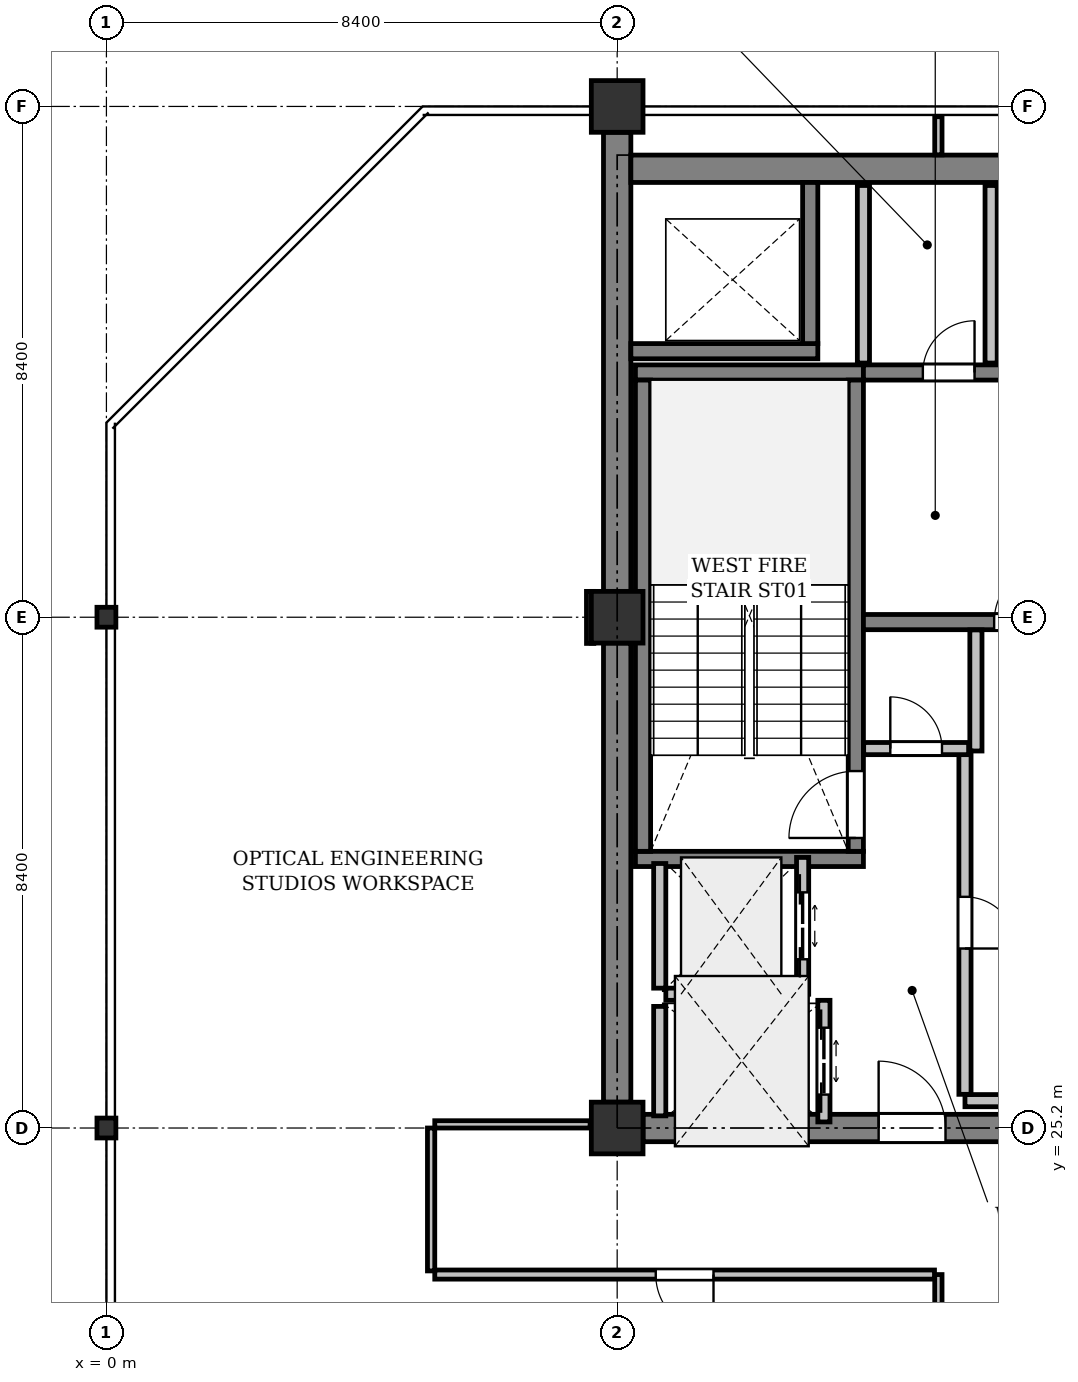
"""IFC4 building model, lengths in metres.
Left out: names, types, materials, properties, quantities, classifications, styles, units other than length and angle.
Written with IfcOpenShell. Run it as: python <this file> out.ifc"""

import sys

from ifc_helpers import new_model, si_unit, direction, frame, frame_2d, origin, origin_2d, place, context, subcontext, project, spatial, rectangle, i_section, extrude, element, fill, save


model = new_model("IFC4")
c1 = context("Model", 3, precision=1e-05, world=origin(), true_north=direction((0.0, 1.0)))
c2 = subcontext(c1, "Body", "Model", "MODEL_VIEW")
j1 = project(units=[si_unit("LENGTHUNIT", "METRE"), si_unit("PLANEANGLEUNIT", "RADIAN")], contexts=[c1])
p1 = place(None, origin())
s1 = spatial("IfcSite", under=j1, at=p1, CompositionType="ELEMENT")
p2 = place(p1, origin())
s2 = spatial("IfcBuilding", under=s1, at=p2, CompositionType="ELEMENT")
p3 = place(p2, frame((0.0, 0.0, 314.2)))
s3 = spatial("IfcBuildingStorey", under=s2, at=p3, CompositionType="ELEMENT", Elevation=314.2)
for number, where, z_axis, x_axis in (
    (1, (0.0, 25.2, 0.0), (0.0, 0.0, 1.0), (1.0, 0.0, 0.0)),
    (2, (0.0, 33.6, 0.0), (0.0, 0.0, 1.0), (1.0, 0.0, 0.0)),
):
    element("IfcColumn", number, at=place(p3, frame(where, z_axis=z_axis, x_axis=x_axis)), inside=s3, PredefinedType="COLUMN", context=c2, shape_type="SweptSolid", body=[
        extrude(i_section(OverallWidth=0.311, OverallDepth=0.327, WebThickness=0.016, FlangeThickness=0.025, FilletRadius=0.017, at=origin_2d()), origin(), (0.0, 0.0, 1.0), 4.0),
    ])
for number, where, z_axis, x_axis in (
    (3, (8.4, 25.2, 0.0), (0.0, 0.0, 1.0), (1.0, 0.0, 0.0)),
    (4, (8.4, 33.6, 0.0), (0.0, 0.0, 1.0), (1.0, 0.0, 0.0)),
    (5, (8.4, 42.0, 0.0), (0.0, 0.0, 1.0), (1.0, 0.0, 0.0)),
):
    element("IfcColumn", number, at=place(p3, frame(where, z_axis=z_axis, x_axis=x_axis)), inside=s3, PredefinedType="COLUMN", context=c2, shape_type="SweptSolid", body=[
        extrude(rectangle(XDim=0.85, YDim=0.85, at=origin_2d()), origin(), (0.0, 0.0, 1.0), 4.0),
    ])
for number, where, z_axis, x_axis in (
    (6, (8.4, 25.625, 0.0), (0.0, 0.0, 1.0), (0.0, 1.0, 0.0)),
    (7, (8.4, 34.025, 0.0), (0.0, 0.0, 1.0), (0.0, 1.0, 0.0)),
):
    element("IfcWall", number, at=place(p3, frame(where, z_axis=z_axis, x_axis=x_axis)), inside=s3, PredefinedType="SHEAR", context=c2, shape_type="SweptSolid", body=[
        extrude(rectangle(XDim=7.55, YDim=0.45, at=frame_2d((3.775, 0.0))), origin(), (0.0, 0.0, 1.0), 3.725),
    ])
p4 = place(p3, frame((8.625, 40.975, 0.0), z_axis=(0.0, 0.0, 1.0), x_axis=(1.0, 0.0, 0.0)))
e8 = element("IfcWall", 8, at=p4, inside=s3, PredefinedType="SHEAR", context=c2, shape_type="SweptSolid", body=[
    extrude(rectangle(XDim=7.95, YDim=0.45, at=frame_2d((3.975, 0.0))), origin(), (0.0, 0.0, 1.0), 3.725),
])
p5 = place(p3, frame((8.825, 25.2, 0.0), z_axis=(0.0, 0.0, 1.0), x_axis=(1.0, 0.0, 0.0)))
e9 = element("IfcWall", 9, at=p5, inside=s3, PredefinedType="SHEAR", context=c2, shape_type="SweptSolid", body=[
    extrude(rectangle(XDim=7.55, YDim=0.45, at=frame_2d((3.775, 0.0))), origin(), (0.0, 0.0, 1.0), 3.725),
])
p6 = place(p5, frame((3.875, 0.0, 0.0)))
e10 = element("IfcOpeningElement", 10, at=p6, cuts=e9, PredefinedType="OPENING", context=c2, shape_type="SweptSolid", body=[
    extrude(rectangle(XDim=1.1, YDim=2.15, at=frame_2d((0.55, 1.075))), frame((0.0, 0.235, 0.0), z_axis=(0.0, -1.0, 0.0), x_axis=(1.0, 0.0, 0.0)), (0.0, 0.0, 1.0), 0.47),
])
for number, where, z_axis, x_axis in (
    (11, (12.45, 29.625, 0.0), (0.0, 0.0, 1.0), (-1.0, 0.0, 0.0)),
    (12, (12.45, 37.625, 0.0), (0.0, 0.0, 1.0), (-1.0, 0.0, 0.0)),
):
    element("IfcWall", number, at=place(p3, frame(where, z_axis=z_axis, x_axis=x_axis)), inside=s3, PredefinedType="SHEAR", context=c2, shape_type="SweptSolid", body=[
        extrude(rectangle(XDim=3.75, YDim=0.25, at=frame_2d((1.875, 0.0))), origin(), (0.0, 0.0, 1.0), 3.725),
    ])
p7 = place(p3, frame((12.325, 29.75, 0.0), z_axis=(0.0, 0.0, 1.0), x_axis=(0.0, 1.0, 0.0)))
e13 = element("IfcWall", 13, at=p7, inside=s3, PredefinedType="SHEAR", context=c2, shape_type="SweptSolid", body=[
    extrude(rectangle(XDim=7.75, YDim=0.25, at=frame_2d((3.875, 0.0))), origin(), (0.0, 0.0, 1.0), 3.725),
])
p8 = place(p7, frame((0.22, 0.0, 0.0)))
e14 = element("IfcOpeningElement", 14, at=p8, cuts=e13, PredefinedType="OPENING", context=c2, shape_type="SweptSolid", body=[
    extrude(rectangle(XDim=1.1, YDim=2.15, at=frame_2d((0.55, 1.075))), frame((0.0, 0.135, 0.0), z_axis=(0.0, -1.0, 0.0), x_axis=(1.0, 0.0, 0.0)), (0.0, 0.0, 1.0), 0.27),
])
p9 = place(p3, frame((8.825, 29.75, 0.0), z_axis=(0.0, 0.0, 1.0), x_axis=(0.0, 1.0, 0.0)))
e15 = element("IfcWall", 15, at=p9, inside=s3, PredefinedType="SHEAR", context=c2, shape_type="SweptSolid", body=[
    extrude(rectangle(XDim=7.75, YDim=0.25, at=frame_2d((3.875, 0.0))), origin(), (0.0, 0.0, 1.0), 3.725),
])
p10 = place(p3, frame((8.625, 37.975, 0.0), z_axis=(0.0, 0.0, 1.0), x_axis=(1.0, 0.0, 0.0)))
e16 = element("IfcWall", 16, at=p10, inside=s3, PredefinedType="SHEAR", context=c2, shape_type="SweptSolid", body=[
    extrude(rectangle(XDim=3.075, YDim=0.25, at=frame_2d((1.538, 0.0))), origin(), (0.0, 0.0, 1.0), 3.725),
])
p11 = place(p3, frame((11.575, 38.1, 0.0), z_axis=(0.0, 0.0, 1.0), x_axis=(0.0, 1.0, 0.0)))
e17 = element("IfcWall", 17, at=p11, inside=s3, PredefinedType="SHEAR", context=c2, shape_type="SweptSolid", body=[
    extrude(rectangle(XDim=2.65, YDim=0.25, at=frame_2d((1.325, 0.0))), origin(), (0.0, 0.0, 1.0), 3.725),
])
p12 = place(p3, frame((12.45, 33.52, 0.0), z_axis=(0.0, 0.0, 1.0), x_axis=(1.0, 0.0, 0.0)))
e18 = element("IfcWall", 18, at=p12, inside=s3, PredefinedType="SHEAR", context=c2, shape_type="SweptSolid", body=[
    extrude(rectangle(XDim=3.925, YDim=0.25, at=frame_2d((1.962, 0.0))), origin(), (0.0, 0.0, 1.0), 3.725),
])
p13 = place(p12, frame((2.15, 0.0, 0.0)))
e19 = element("IfcOpeningElement", 19, at=p13, cuts=e18, PredefinedType="OPENING", context=c2, shape_type="SweptSolid", body=[
    extrude(rectangle(XDim=1.0, YDim=2.15, at=frame_2d((0.5, 1.075))), frame((0.0, 0.135, 0.0), z_axis=(0.0, -1.0, 0.0), x_axis=(1.0, 0.0, 0.0)), (0.0, 0.0, 1.0), 0.27),
])
p14 = place(p3, frame((12.45, 37.625, 0.0), z_axis=(0.0, 0.0, 1.0), x_axis=(1.0, 0.0, 0.0)))
e20 = element("IfcWall", 20, at=p14, inside=s3, PredefinedType="SHEAR", context=c2, shape_type="SweptSolid", body=[
    extrude(rectangle(XDim=4.125, YDim=0.25, at=frame_2d((2.062, 0.0))), origin(), (0.0, 0.0, 1.0), 3.725),
])
p15 = place(p14, frame((0.978, 0.0, 0.0)))
e21 = element("IfcOpeningElement", 21, at=p15, cuts=e20, PredefinedType="OPENING", context=c2, shape_type="SweptSolid", body=[
    extrude(rectangle(XDim=0.85, YDim=2.15, at=frame_2d((0.425, 1.075))), frame((0.0, 0.135, 0.0), z_axis=(0.0, -1.0, 0.0), x_axis=(1.0, 0.0, 0.0)), (0.0, 0.0, 1.0), 0.27),
])
p16 = place(p14, frame((2.298, 0.0, 0.0)))
e22 = element("IfcOpeningElement", 22, at=p16, cuts=e20, PredefinedType="OPENING", context=c2, shape_type="SweptSolid", body=[
    extrude(rectangle(XDim=0.85, YDim=2.15, at=frame_2d((0.425, 1.075))), frame((0.0, 0.135, 0.0), z_axis=(0.0, -1.0, 0.0), x_axis=(1.0, 0.0, 0.0)), (0.0, 0.0, 1.0), 0.27),
])
p17 = place(p3, frame((11.45, 27.4, 0.0), z_axis=(0.0, 0.0, 1.0), x_axis=(0.0, 1.0, 0.0)))
e23 = element("IfcWall", 23, at=p17, inside=s3, PredefinedType="PARTITIONING", context=c2, shape_type="SweptSolid", body=[
    extrude(rectangle(XDim=2.25, YDim=0.2, at=frame_2d((1.125, 0.0))), origin(), (0.0, 0.0, 1.0), 3.725),
])
p18 = place(p17, frame((0.575, 0.0, 0.0)))
e24 = element("IfcOpeningElement", 24, at=p18, cuts=e23, PredefinedType="OPENING", context=c2, shape_type="SweptSolid", body=[
    extrude(rectangle(XDim=1.1, YDim=2.2, at=frame_2d((0.55, 1.1))), frame((0.0, 0.11, 0.0), z_axis=(0.0, -1.0, 0.0), x_axis=(1.0, 0.0, 0.0)), (0.0, 0.0, 1.0), 0.22),
])
p19 = place(p3, frame((9.1, 27.5, 0.0), z_axis=(0.0, 0.0, 1.0), x_axis=(0.0, 1.0, 0.0)))
e25 = element("IfcWall", 25, at=p19, inside=s3, PredefinedType="PARTITIONING", context=c2, shape_type="SweptSolid", body=[
    extrude(rectangle(XDim=2.05, YDim=0.2, at=frame_2d((1.025, 0.0))), origin(), (0.0, 0.0, 1.0), 3.725),
])
p20 = place(p3, frame((9.2, 27.4, 0.0), z_axis=(0.0, 0.0, 1.0), x_axis=(1.0, 0.0, 0.0)))
e26 = element("IfcWall", 26, at=p20, inside=s3, PredefinedType="PARTITIONING", context=c2, shape_type="SweptSolid", body=[
    extrude(rectangle(XDim=2.15, YDim=0.2, at=frame_2d((1.075, 0.0))), origin(), (0.0, 0.0, 1.0), 3.725),
])
p21 = place(p3, frame((11.8, 25.3, 0.0), z_axis=(0.0, 0.0, 1.0), x_axis=(0.0, 1.0, 0.0)))
e27 = element("IfcWall", 27, at=p21, inside=s3, PredefinedType="PARTITIONING", context=c2, shape_type="SweptSolid", body=[
    extrude(rectangle(XDim=2.0, YDim=0.2, at=frame_2d((1.0, 0.0))), origin(), (0.0, 0.0, 1.0), 3.725),
])
p22 = place(p21, frame((0.45, 0.0, 0.0)))
e28 = element("IfcOpeningElement", 28, at=p22, cuts=e27, PredefinedType="OPENING", context=c2, shape_type="SweptSolid", body=[
    extrude(rectangle(XDim=1.1, YDim=2.2, at=frame_2d((0.55, 1.1))), frame((0.0, 0.11, 0.0), z_axis=(0.0, -1.0, 0.0), x_axis=(1.0, 0.0, 0.0)), (0.0, 0.0, 1.0), 0.22),
])
p23 = place(p3, frame((9.1, 25.4, 0.0), z_axis=(0.0, 0.0, 1.0), x_axis=(0.0, 1.0, 0.0)))
e29 = element("IfcWall", 29, at=p23, inside=s3, PredefinedType="PARTITIONING", context=c2, shape_type="SweptSolid", body=[
    extrude(rectangle(XDim=1.8, YDim=0.2, at=frame_2d((0.9, 0.0))), origin(), (0.0, 0.0, 1.0), 3.725),
])
p24 = place(p3, frame((14.12, 25.65, 0.0), z_axis=(0.0, 0.0, 1.0), x_axis=(1.0, 0.0, 0.0)))
e30 = element("IfcWall", 30, at=p24, inside=s3, PredefinedType="PARTITIONING", context=c2, shape_type="SweptSolid", body=[
    extrude(rectangle(XDim=2.33, YDim=0.2, at=frame_2d((1.165, 0.0))), origin(), (0.0, 0.0, 1.0), 3.725),
])
p25 = place(p3, frame((14.3, 33.391, 0.0), z_axis=(0.0, 0.0, 1.0), x_axis=(0.0, -1.0, 0.0)))
e31 = element("IfcWall", 31, at=p25, inside=s3, PredefinedType="PARTITIONING", context=c2, shape_type="SweptSolid", body=[
    extrude(rectangle(XDim=1.991, YDim=0.2, at=frame_2d((0.996, 0.0))), origin(), (0.0, 0.0, 1.0), 3.725),
])
p26 = place(p3, frame((14.12, 31.4, 0.0), z_axis=(0.0, 0.0, 1.0), x_axis=(0.0, -1.0, 0.0)))
e32 = element("IfcWall", 32, at=p26, inside=s3, PredefinedType="PARTITIONING", context=c2, shape_type="SweptSolid", body=[
    extrude(rectangle(XDim=5.646, YDim=0.2, at=frame_2d((2.823, 0.0))), origin(), (0.0, 0.0, 1.0), 3.725),
])
p27 = place(p26, frame((2.398, 0.0, 0.0)))
e33 = element("IfcOpeningElement", 33, at=p27, cuts=e32, PredefinedType="OPENING", context=c2, shape_type="SweptSolid", body=[
    extrude(rectangle(XDim=0.85, YDim=2.15, at=frame_2d((0.425, 1.075))), frame((0.0, 0.11, 0.0), z_axis=(0.0, -1.0, 0.0), x_axis=(1.0, 0.0, 0.0)), (0.0, 0.0, 1.0), 0.22),
])
p28 = place(p3, frame((12.454, 31.44, 0.0), z_axis=(0.0, 0.0, 1.0), x_axis=(1.0, 0.0, 0.0)))
e34 = element("IfcWall", 34, at=p28, inside=s3, PredefinedType="PARTITIONING", context=c2, shape_type="SweptSolid", body=[
    extrude(rectangle(XDim=1.726, YDim=0.2, at=frame_2d((0.863, 0.0))), origin(), (0.0, 0.0, 1.0), 3.725),
])
p29 = place(p28, frame((0.438, 0.0, 0.0)))
e35 = element("IfcOpeningElement", 35, at=p29, cuts=e34, PredefinedType="OPENING", context=c2, shape_type="SweptSolid", body=[
    extrude(rectangle(XDim=0.85, YDim=2.15, at=frame_2d((0.425, 1.075))), frame((0.0, 0.11, 0.0), z_axis=(0.0, -1.0, 0.0), x_axis=(1.0, 0.0, 0.0)), (0.0, 0.0, 1.0), 0.22),
])
for number, where, z_axis, x_axis in (
    (36, (14.55, 37.78, 0.0), (0.0, 0.0, 1.0), (0.0, 1.0, 0.0)),
    (37, (12.45, 40.7, 0.0), (0.0, 0.0, 1.0), (0.0, -1.0, 0.0)),
):
    element("IfcWall", number, at=place(p3, frame(where, z_axis=z_axis, x_axis=x_axis)), inside=s3, PredefinedType="PARTITIONING", context=c2, shape_type="SweptSolid", body=[
        extrude(rectangle(XDim=2.92, YDim=0.2, at=frame_2d((1.46, 0.0))), origin(), (0.0, 0.0, 1.0), 2.775),
    ])
p30 = place(p3, frame((5.34, 23.214, 0.0), z_axis=(0.0, 0.0, 1.0), x_axis=(-1.0, 0.0, 0.0)))
e38 = element("IfcWall", 38, at=p30, inside=s3, PredefinedType="PARTITIONING", context=c2, shape_type="SweptSolid", body=[
    extrude(rectangle(XDim=5.171, YDim=0.135, at=frame_2d((2.585, 0.0))), origin(), (0.0, 0.0, 1.0), 3.421),
])
p31 = place(p3, frame((14.09, 20.266, 0.0), z_axis=(0.0, 0.0, 1.0), x_axis=(0.0, 1.0, 0.0)))
e39 = element("IfcWall", 39, at=p31, inside=s3, PredefinedType="PARTITIONING", context=c2, shape_type="SweptSolid", body=[
    extrude(rectangle(XDim=2.524, YDim=0.12, at=frame_2d((1.262, 0.0))), origin(), (0.0, 0.0, 1.0), 3.725),
])
p32 = place(p3, frame((14.026, 22.79, 0.0), z_axis=(0.0, 0.0, 1.0), x_axis=(-1.0, 0.0, 0.0)))
e40 = element("IfcWall", 40, at=p32, inside=s3, PredefinedType="PARTITIONING", context=c2, shape_type="SweptSolid", body=[
    extrude(rectangle(XDim=8.626, YDim=0.15, at=frame_2d((4.313, 0.0))), origin(), (0.0, 0.0, 1.0), 3.319),
])
p33 = place(p32, frame((3.838, 0.0, 0.0)))
e41 = element("IfcOpeningElement", 41, at=p33, cuts=e40, PredefinedType="OPENING", context=c2, shape_type="SweptSolid", body=[
    extrude(rectangle(XDim=0.95, YDim=2.15, at=frame_2d((0.475, 1.075))), frame((0.0, 0.085, 0.0), z_axis=(0.0, -1.0, 0.0), x_axis=(1.0, 0.0, 0.0)), (0.0, 0.0, 1.0), 0.17),
])
p34 = place(p3, frame((13.683, 41.831, 0.0), z_axis=(0.0, 0.0, 1.0), x_axis=(0.0, -1.0, 0.0)))
e42 = element("IfcWall", 42, at=p34, inside=s3, PredefinedType="PARTITIONING", context=c2, shape_type="SweptSolid", body=[
    extrude(rectangle(XDim=0.627, YDim=0.12, at=frame_2d((0.313, 0.0))), origin(), (0.0, 0.0, 1.0), 3.725),
])
p35 = place(p3, frame((5.34, 23.334, 0.0), z_axis=(0.0, 0.0, 1.0), x_axis=(0.0, 1.0, 0.0)))
e43 = element("IfcWall", 43, at=p35, inside=s3, PredefinedType="PARTITIONING", context=c2, shape_type="SweptSolid", body=[
    extrude(rectangle(XDim=1.865, YDim=0.12, at=frame_2d((0.933, 0.0))), origin(), (0.0, 0.0, 1.0), 3.271),
])
p36 = place(p3, frame((5.4, 25.26, 0.0), z_axis=(0.0, 0.0, 1.0), x_axis=(1.0, 0.0, 0.0)))
e44 = element("IfcWall", 44, at=p36, inside=s3, PredefinedType="PARTITIONING", context=c2, shape_type="SweptSolid", body=[
    extrude(rectangle(XDim=2.555, YDim=0.12, at=frame_2d((1.278, 0.0))), origin(), (0.0, 0.0, 1.0), 3.271),
])
p37 = place(p36, frame((0.802, 0.0, 0.0)))
e45 = element("IfcOpeningElement", 45, at=p37, cuts=e44, PredefinedType="OPENING", context=c2, shape_type="SweptSolid", body=[
    extrude(rectangle(XDim=0.95, YDim=2.15, at=frame_2d((0.475, 1.075))), frame((0.0, 0.07, 0.0), z_axis=(0.0, -1.0, 0.0), x_axis=(1.0, 0.0, 0.0)), (0.0, 0.0, 1.0), 0.14),
])
p38 = place(p3, frame((7.956, 33.169, 0.0), z_axis=(0.0, 0.0, 1.0), x_axis=(-0.000855919801, 0.999999633701, 0.0)))
e46 = element("IfcWall", 46, at=p38, inside=s3, PredefinedType="PARTITIONING", context=c2, shape_type="SweptSolid", body=[
    extrude(rectangle(XDim=0.856, YDim=0.12, at=frame_2d((0.428, 0.0))), origin(), (0.0, 0.0, 1.0), 3.271),
])
p39 = place(p6, origin())
e47 = element("IfcDoor", 47, at=p39, inside=s3, OperationType="SINGLE_SWING_RIGHT", PredefinedType="DOOR", context=c2, shape_type="SweptSolid", body=[
    extrude(rectangle(XDim=1.1, YDim=2.15, at=frame_2d((0.55, 1.075))), frame((0.0, 0.025, 0.0), z_axis=(0.0, -1.0, 0.0), x_axis=(1.0, 0.0, 0.0)), (0.0, 0.0, 1.0), 0.05),
])
fill(e10, e47)
p40 = place(p8, origin())
e48 = element("IfcDoor", 48, at=p40, inside=s3, OperationType="SINGLE_SWING_RIGHT", PredefinedType="DOOR", context=c2, shape_type="SweptSolid", body=[
    extrude(rectangle(XDim=1.1, YDim=2.15, at=frame_2d((0.55, 1.075))), frame((0.0, 0.025, 0.0), z_axis=(0.0, -1.0, 0.0), x_axis=(1.0, 0.0, 0.0)), (0.0, 0.0, 1.0), 0.05),
])
fill(e14, e48)
p41 = place(p13, origin())
e49 = element("IfcDoor", 49, at=p41, inside=s3, OperationType="SINGLE_SWING_RIGHT", PredefinedType="DOOR", context=c2, shape_type="SweptSolid", body=[
    extrude(rectangle(XDim=1.0, YDim=2.15, at=frame_2d((0.5, 1.075))), frame((0.0, 0.025, 0.0), z_axis=(0.0, -1.0, 0.0), x_axis=(1.0, 0.0, 0.0)), (0.0, 0.0, 1.0), 0.05),
])
fill(e19, e49)
p42 = place(p18, origin())
e50 = element("IfcDoor", 50, at=p42, inside=s3, OperationType="DOUBLE_DOOR_SLIDING", PredefinedType="DOOR", context=c2, shape_type="SweptSolid", body=[
    extrude(rectangle(XDim=1.1, YDim=2.2, at=frame_2d((0.55, 1.1))), frame((0.0, 0.025, 0.0), z_axis=(0.0, -1.0, 0.0), x_axis=(1.0, 0.0, 0.0)), (0.0, 0.0, 1.0), 0.05),
])
fill(e24, e50)
p43 = place(p22, origin())
e51 = element("IfcDoor", 51, at=p43, inside=s3, OperationType="DOUBLE_DOOR_SLIDING", PredefinedType="DOOR", context=c2, shape_type="SweptSolid", body=[
    extrude(rectangle(XDim=1.1, YDim=2.2, at=frame_2d((0.55, 1.1))), frame((0.0, 0.025, 0.0), z_axis=(0.0, -1.0, 0.0), x_axis=(1.0, 0.0, 0.0)), (0.0, 0.0, 1.0), 0.05),
])
fill(e28, e51)
p44 = place(p27, origin())
e52 = element("IfcDoor", 52, at=p44, inside=s3, OperationType="SINGLE_SWING_RIGHT", PredefinedType="DOOR", context=c2, shape_type="SweptSolid", body=[
    extrude(rectangle(XDim=0.85, YDim=2.15, at=frame_2d((0.425, 1.075))), frame((0.0, 0.025, 0.0), z_axis=(0.0, -1.0, 0.0), x_axis=(1.0, 0.0, 0.0)), (0.0, 0.0, 1.0), 0.05),
])
fill(e33, e52)
p45 = place(p29, origin())
e53 = element("IfcDoor", 53, at=p45, inside=s3, OperationType="SINGLE_SWING_LEFT", PredefinedType="DOOR", context=c2, shape_type="SweptSolid", body=[
    extrude(rectangle(XDim=0.85, YDim=2.15, at=frame_2d((0.425, 1.075))), frame((0.0, 0.025, 0.0), z_axis=(0.0, -1.0, 0.0), x_axis=(1.0, 0.0, 0.0)), (0.0, 0.0, 1.0), 0.05),
])
fill(e35, e53)
p46 = place(p15, origin())
e54 = element("IfcDoor", 54, at=p46, inside=s3, OperationType="SINGLE_SWING_RIGHT", PredefinedType="DOOR", context=c2, shape_type="SweptSolid", body=[
    extrude(rectangle(XDim=0.85, YDim=2.15, at=frame_2d((0.425, 1.075))), frame((0.0, 0.025, 0.0), z_axis=(0.0, -1.0, 0.0), x_axis=(1.0, 0.0, 0.0)), (0.0, 0.0, 1.0), 0.05),
])
fill(e21, e54)
p47 = place(p33, origin())
e55 = element("IfcDoor", 55, at=p47, inside=s3, OperationType="SINGLE_SWING_LEFT", PredefinedType="DOOR", context=c2, shape_type="SweptSolid", body=[
    extrude(rectangle(XDim=0.95, YDim=2.15, at=frame_2d((0.475, 1.075))), frame((0.0, 0.025, 0.0), z_axis=(0.0, -1.0, 0.0), x_axis=(1.0, 0.0, 0.0)), (0.0, 0.0, 1.0), 0.05),
])
fill(e41, e55)
p48 = place(p37, origin())
e56 = element("IfcDoor", 56, at=p48, inside=s3, OperationType="SINGLE_SWING_LEFT", PredefinedType="DOOR", context=c2, shape_type="SweptSolid", body=[
    extrude(rectangle(XDim=0.95, YDim=2.15, at=frame_2d((0.475, 1.075))), frame((0.0, 0.025, 0.0), z_axis=(0.0, -1.0, 0.0), x_axis=(1.0, 0.0, 0.0)), (0.0, 0.0, 1.0), 0.05),
])
fill(e45, e56)
save(model, sys.argv[1])
